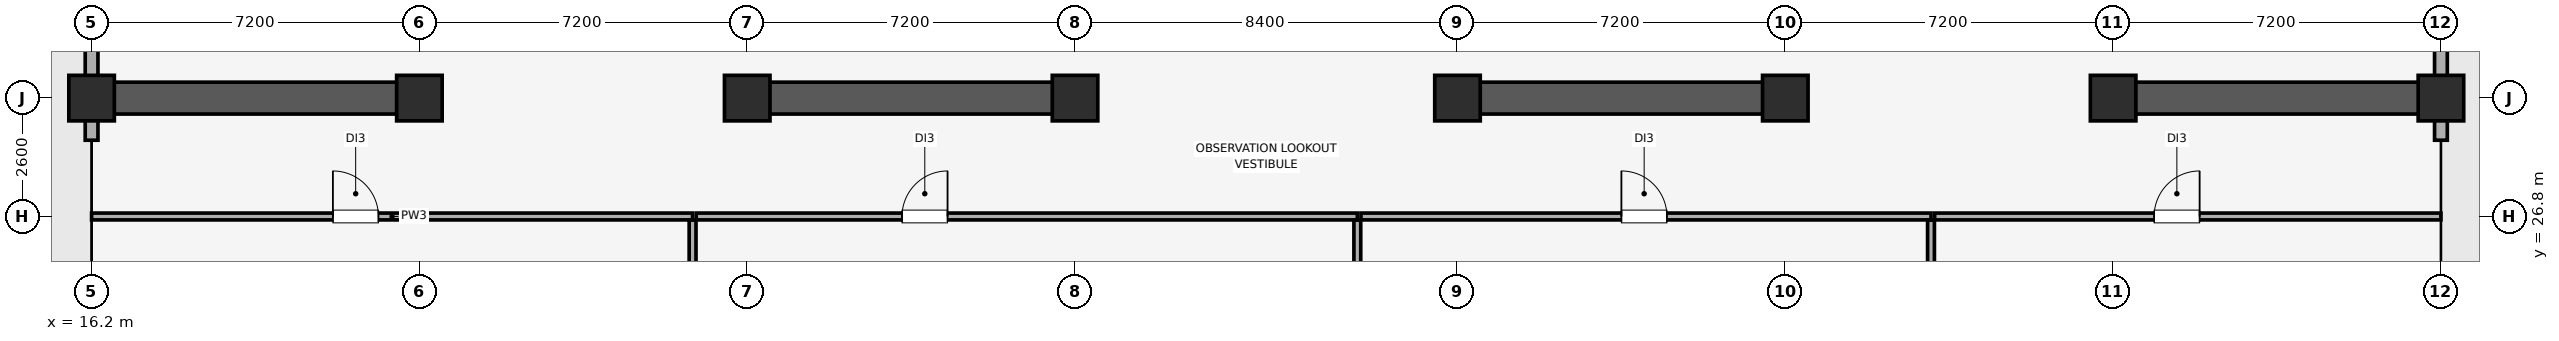
"""IFC4 building model, lengths in metres.
Left out: names, types, materials, properties, quantities, classifications, styles, units other than length and angle.
Written with IfcOpenShell. Run it as: python <this file> out.ifc"""

import sys

from ifc_helpers import new_model, si_unit, direction, frame, frame_2d, origin, origin_2d, place, context, subcontext, project, spatial, rectangle, extrude, element, fill, save


model = new_model("IFC4")
c1 = context("Model", 3, precision=1e-05, world=origin(), true_north=direction((0.0, 1.0)))
c2 = subcontext(c1, "Body", "Model", "MODEL_VIEW")
j1 = project(units=[si_unit("LENGTHUNIT", "METRE"), si_unit("PLANEANGLEUNIT", "RADIAN")], contexts=[c1])
p1 = place(None, origin())
s1 = spatial("IfcSite", under=j1, at=p1, CompositionType="ELEMENT")
p2 = place(p1, origin())
s2 = spatial("IfcBuilding", under=s1, at=p2, CompositionType="ELEMENT")
p3 = place(p2, frame((0.0, 0.0, 310.7)))
s3 = spatial("IfcBuildingStorey", under=s2, at=p3, CompositionType="ELEMENT", Elevation=310.7)
for number, where, z_axis, x_axis in (
    (1, (16.2, 29.4, 0.0), (0.0, 0.0, 1.0), (1.0, 0.0, 0.0)),
    (2, (23.4, 29.4, 0.0), (0.0, 0.0, 1.0), (1.0, 0.0, 0.0)),
    (3, (30.6, 29.4, 0.0), (0.0, 0.0, 1.0), (1.0, 0.0, 0.0)),
    (4, (37.8, 29.4, 0.0), (0.0, 0.0, 1.0), (1.0, 0.0, 0.0)),
    (5, (46.2, 29.4, 0.0), (0.0, 0.0, 1.0), (1.0, 0.0, 0.0)),
    (6, (53.4, 29.4, 0.0), (0.0, 0.0, 1.0), (1.0, 0.0, 0.0)),
    (7, (60.6, 29.4, 0.0), (0.0, 0.0, 1.0), (1.0, 0.0, 0.0)),
    (8, (67.8, 29.4, 0.0), (0.0, 0.0, 1.0), (1.0, 0.0, 0.0)),
):
    element("IfcColumn", number, at=place(p3, frame(where, z_axis=z_axis, x_axis=x_axis)), inside=s3, PredefinedType="COLUMN", context=c2, shape_type="SweptSolid", body=[
        extrude(rectangle(XDim=1.0, YDim=1.0, at=origin_2d()), origin(), (0.0, 0.0, 1.0), 7.5),
    ])
for number, where, z_axis, x_axis in (
    (9, (67.8, 28.475, 0.0), (0.0, 0.0, 1.0), (0.0, 1.0, 0.0)),
    (10, (16.2, 48.2, 0.0), (0.0, 0.0, 1.0), (0.0, -1.0, 0.0)),
):
    element("IfcWall", number, at=place(p3, frame(where, z_axis=z_axis, x_axis=x_axis)), inside=s3, PredefinedType="SOLIDWALL", context=c2, shape_type="SweptSolid", body=[
        extrude(rectangle(XDim=19.725, YDim=0.28, at=frame_2d((9.862, 0.0))), origin(), (0.0, 0.0, 1.0), 7.2),
    ])
p4 = place(p3, frame((16.345, 29.4, 0.0), z_axis=(0.0, 0.0, 1.0), x_axis=(1.0, 0.0, 0.0)))
e11 = element("IfcWall", 11, at=p4, inside=s3, PredefinedType="SHEAR", context=c2, shape_type="SweptSolid", body=[
    extrude(rectangle(XDim=7.255, YDim=0.7, at=frame_2d((3.627, 0.0))), origin(), (0.0, 0.0, 1.0), 7.5),
])
for number, where, z_axis, x_axis in (
    (12, (30.4, 29.4, 0.0), (0.0, 0.0, 1.0), (1.0, 0.0, 0.0)),
    (13, (46.0, 29.4, 0.0), (0.0, 0.0, 1.0), (1.0, 0.0, 0.0)),
):
    element("IfcWall", number, at=place(p3, frame(where, z_axis=z_axis, x_axis=x_axis)), inside=s3, PredefinedType="SHEAR", context=c2, shape_type="SweptSolid", body=[
        extrude(rectangle(XDim=7.6, YDim=0.7, at=frame_2d((3.8, 0.0))), origin(), (0.0, 0.0, 1.0), 7.5),
    ])
p5 = place(p3, frame((60.4, 29.4, 0.0), z_axis=(0.0, 0.0, 1.0), x_axis=(1.0, 0.0, 0.0)))
e14 = element("IfcWall", 14, at=p5, inside=s3, PredefinedType="SHEAR", context=c2, shape_type="SweptSolid", body=[
    extrude(rectangle(XDim=7.255, YDim=0.7, at=frame_2d((3.627, 0.0))), origin(), (0.0, 0.0, 1.0), 7.5),
])
p6 = place(p3, frame((16.2, 26.8, 0.0), z_axis=(0.0, 0.0, 1.0), x_axis=(1.0, 0.0, 0.0)))
e15 = element("IfcWall", 15, at=p6, inside=s3, PredefinedType="PARTITIONING", context=c2, shape_type="SweptSolid", body=[
    extrude(rectangle(XDim=13.2, YDim=0.15, at=frame_2d((6.6, 0.0))), origin(), (0.0, 0.0, 1.0), 7.5),
])
p7 = place(p6, frame((5.3, 0.0, 0.0)))
e16 = element("IfcOpeningElement", 16, at=p7, cuts=e15, PredefinedType="OPENING", context=c2, shape_type="SweptSolid", body=[
    extrude(rectangle(XDim=1.0, YDim=2.15, at=frame_2d((0.5, 1.075))), frame((0.0, 0.085, 0.0), z_axis=(0.0, -1.0, 0.0), x_axis=(1.0, 0.0, 0.0)), (0.0, 0.0, 1.0), 0.17),
])
p8 = place(p3, frame((29.4, 15.15, 0.0), z_axis=(0.0, 0.0, 1.0), x_axis=(0.0, 1.0, 0.0)))
e17 = element("IfcWall", 17, at=p8, inside=s3, PredefinedType="PARTITIONING", context=c2, shape_type="SweptSolid", body=[
    extrude(rectangle(XDim=11.57, YDim=0.15, at=frame_2d((5.785, 0.0))), origin(), (0.0, 0.0, 1.0), 7.5),
])
p9 = place(p3, frame((29.48, 26.8, 0.0), z_axis=(0.0, 0.0, 1.0), x_axis=(1.0, 0.0, 0.0)))
e18 = element("IfcWall", 18, at=p9, inside=s3, PredefinedType="PARTITIONING", context=c2, shape_type="SweptSolid", body=[
    extrude(rectangle(XDim=14.52, YDim=0.15, at=frame_2d((7.26, 0.0))), origin(), (0.0, 0.0, 1.0), 7.5),
])
p10 = place(p9, frame((4.52, 0.0, 0.0)))
e19 = element("IfcOpeningElement", 19, at=p10, cuts=e18, PredefinedType="OPENING", context=c2, shape_type="SweptSolid", body=[
    extrude(rectangle(XDim=1.0, YDim=2.15, at=frame_2d((0.5, 1.075))), frame((0.0, 0.085, 0.0), z_axis=(0.0, -1.0, 0.0), x_axis=(1.0, 0.0, 0.0)), (0.0, 0.0, 1.0), 0.17),
])
p11 = place(p3, frame((44.0, 15.15, 0.0), z_axis=(0.0, 0.0, 1.0), x_axis=(0.0, 1.0, 0.0)))
e20 = element("IfcWall", 20, at=p11, inside=s3, PredefinedType="PARTITIONING", context=c2, shape_type="SweptSolid", body=[
    extrude(rectangle(XDim=11.57, YDim=0.15, at=frame_2d((5.785, 0.0))), origin(), (0.0, 0.0, 1.0), 7.5),
])
p12 = place(p3, frame((44.08, 26.8, 0.0), z_axis=(0.0, 0.0, 1.0), x_axis=(1.0, 0.0, 0.0)))
e21 = element("IfcWall", 21, at=p12, inside=s3, PredefinedType="PARTITIONING", context=c2, shape_type="SweptSolid", body=[
    extrude(rectangle(XDim=12.52, YDim=0.15, at=frame_2d((6.26, 0.0))), origin(), (0.0, 0.0, 1.0), 7.5),
])
p13 = place(p12, frame((5.72, 0.0, 0.0)))
e22 = element("IfcOpeningElement", 22, at=p13, cuts=e21, PredefinedType="OPENING", context=c2, shape_type="SweptSolid", body=[
    extrude(rectangle(XDim=1.0, YDim=2.15, at=frame_2d((0.5, 1.075))), frame((0.0, 0.085, 0.0), z_axis=(0.0, -1.0, 0.0), x_axis=(1.0, 0.0, 0.0)), (0.0, 0.0, 1.0), 0.17),
])
p14 = place(p3, frame((56.6, 15.15, 0.0), z_axis=(0.0, 0.0, 1.0), x_axis=(0.0, 1.0, 0.0)))
e23 = element("IfcWall", 23, at=p14, inside=s3, PredefinedType="PARTITIONING", context=c2, shape_type="SweptSolid", body=[
    extrude(rectangle(XDim=11.57, YDim=0.15, at=frame_2d((5.785, 0.0))), origin(), (0.0, 0.0, 1.0), 7.5),
])
p15 = place(p3, frame((56.68, 26.8, 0.0), z_axis=(0.0, 0.0, 1.0), x_axis=(1.0, 0.0, 0.0)))
e24 = element("IfcWall", 24, at=p15, inside=s3, PredefinedType="PARTITIONING", context=c2, shape_type="SweptSolid", body=[
    extrude(rectangle(XDim=11.12, YDim=0.15, at=frame_2d((5.56, 0.0))), origin(), (0.0, 0.0, 1.0), 7.5),
])
p16 = place(p15, frame((4.82, 0.0, 0.0)))
e25 = element("IfcOpeningElement", 25, at=p16, cuts=e24, PredefinedType="OPENING", context=c2, shape_type="SweptSolid", body=[
    extrude(rectangle(XDim=1.0, YDim=2.15, at=frame_2d((0.5, 1.075))), frame((0.0, 0.085, 0.0), z_axis=(0.0, -1.0, 0.0), x_axis=(1.0, 0.0, 0.0)), (0.0, 0.0, 1.0), 0.17),
])
p17 = place(p7, origin())
e26 = element("IfcDoor", 26, at=p17, inside=s3, OperationType="SINGLE_SWING_LEFT", PredefinedType="DOOR", context=c2, shape_type="SweptSolid", body=[
    extrude(rectangle(XDim=1.0, YDim=2.15, at=frame_2d((0.5, 1.075))), frame((0.0, 0.025, 0.0), z_axis=(0.0, -1.0, 0.0), x_axis=(1.0, 0.0, 0.0)), (0.0, 0.0, 1.0), 0.05),
])
fill(e16, e26)
p18 = place(p10, origin())
e27 = element("IfcDoor", 27, at=p18, inside=s3, OperationType="SINGLE_SWING_RIGHT", PredefinedType="DOOR", context=c2, shape_type="SweptSolid", body=[
    extrude(rectangle(XDim=1.0, YDim=2.15, at=frame_2d((0.5, 1.075))), frame((0.0, 0.025, 0.0), z_axis=(0.0, -1.0, 0.0), x_axis=(1.0, 0.0, 0.0)), (0.0, 0.0, 1.0), 0.05),
])
fill(e19, e27)
p19 = place(p13, origin())
e28 = element("IfcDoor", 28, at=p19, inside=s3, OperationType="SINGLE_SWING_LEFT", PredefinedType="DOOR", context=c2, shape_type="SweptSolid", body=[
    extrude(rectangle(XDim=1.0, YDim=2.15, at=frame_2d((0.5, 1.075))), frame((0.0, 0.025, 0.0), z_axis=(0.0, -1.0, 0.0), x_axis=(1.0, 0.0, 0.0)), (0.0, 0.0, 1.0), 0.05),
])
fill(e22, e28)
p20 = place(p16, origin())
e29 = element("IfcDoor", 29, at=p20, inside=s3, OperationType="SINGLE_SWING_RIGHT", PredefinedType="DOOR", context=c2, shape_type="SweptSolid", body=[
    extrude(rectangle(XDim=1.0, YDim=2.15, at=frame_2d((0.5, 1.075))), frame((0.0, 0.025, 0.0), z_axis=(0.0, -1.0, 0.0), x_axis=(1.0, 0.0, 0.0)), (0.0, 0.0, 1.0), 0.05),
])
fill(e25, e29)
save(model, sys.argv[1])
